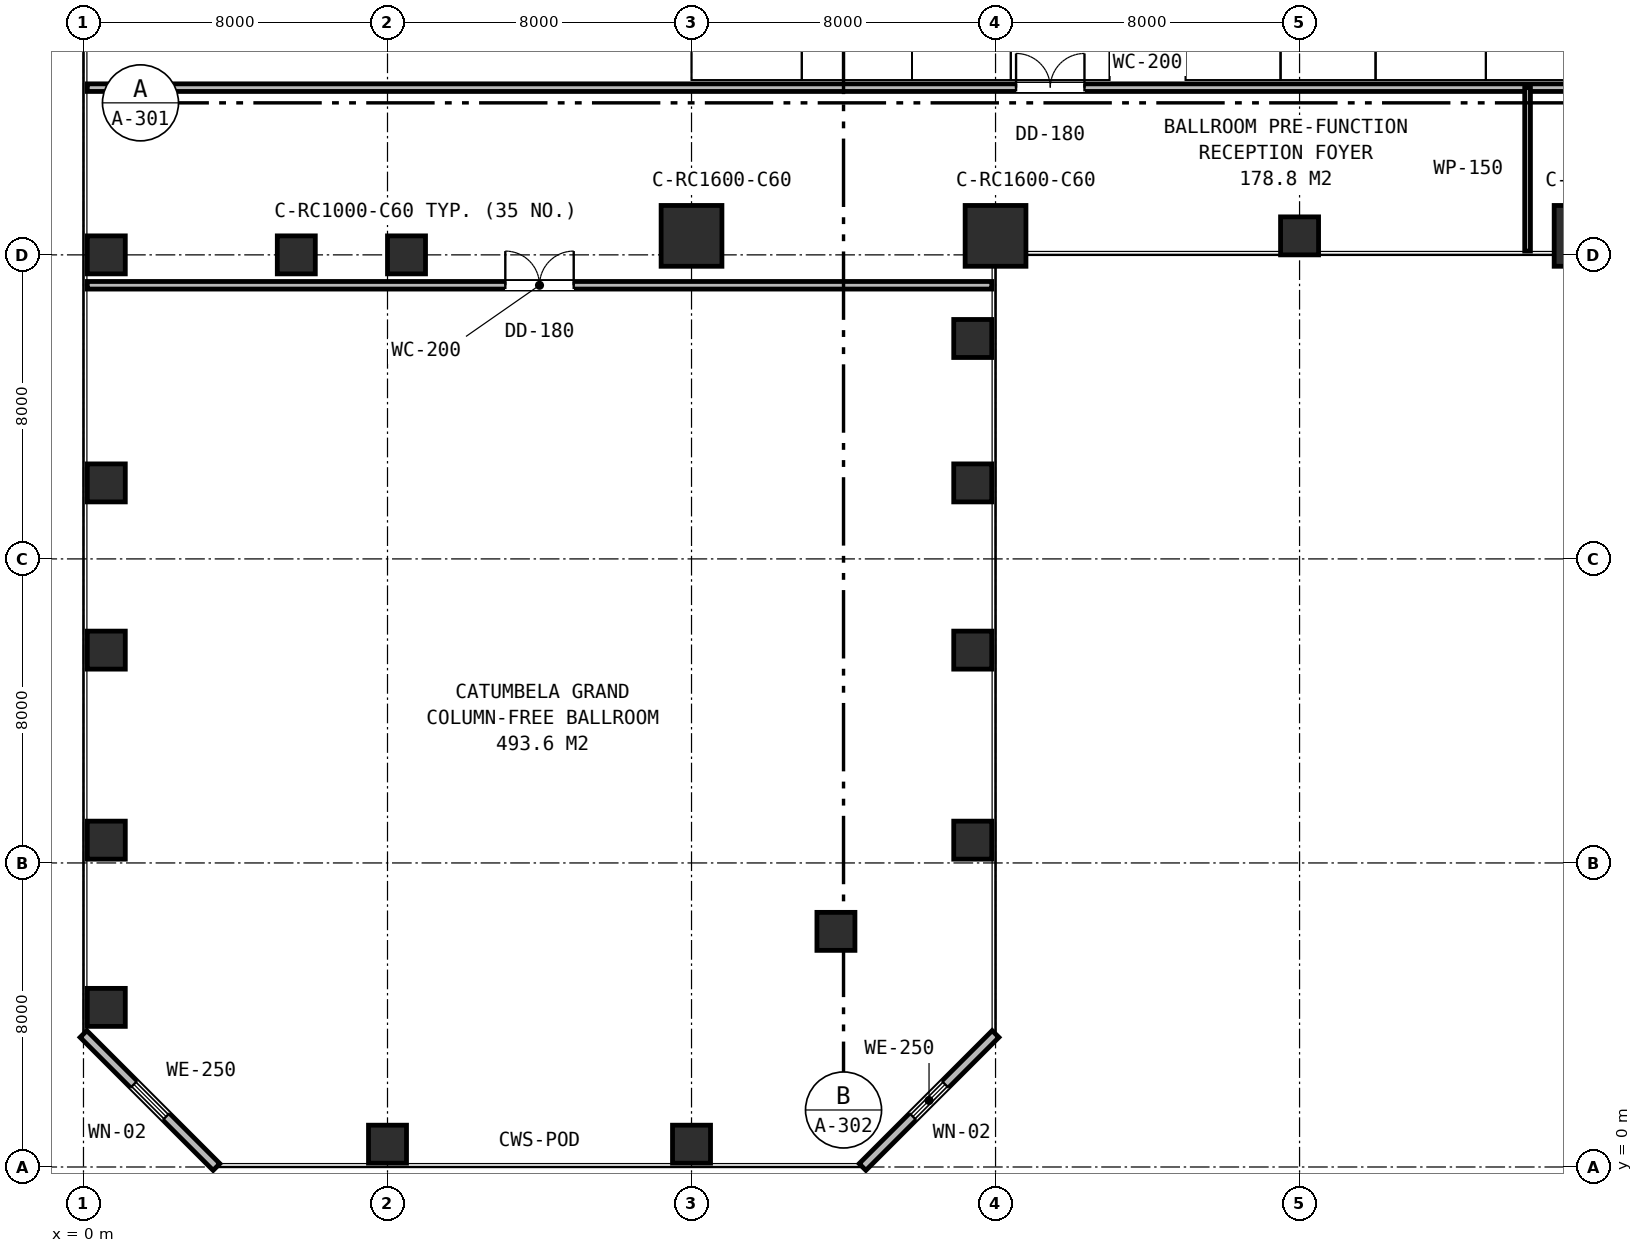
"""IFC4 building model, lengths in metres.
Left out: names, types, materials, properties, quantities, classifications, styles, units other than length and angle.
Written with IfcOpenShell. Run it as: python <this file> out.ifc"""

import sys

from ifc_helpers import new_model, si_unit, direction, frame, frame_2d, origin, origin_2d, place, context, subcontext, project, spatial, rectangle, extrude, element, fill, save


model = new_model("IFC4")
c1 = context("Model", 3, precision=1e-05, world=origin(), true_north=direction((0.0, 1.0)))
c2 = subcontext(c1, "Body", "Model", "MODEL_VIEW")
j1 = project(units=[si_unit("LENGTHUNIT", "METRE"), si_unit("PLANEANGLEUNIT", "RADIAN")], contexts=[c1])
p1 = place(None, origin())
s1 = spatial("IfcSite", under=j1, at=p1, CompositionType="ELEMENT")
p2 = place(p1, origin())
s2 = spatial("IfcBuilding", under=s1, at=p2, CompositionType="ELEMENT")
p3 = place(p2, frame((0.0, 0.0, 15.9)))
s3 = spatial("IfcBuildingStorey", under=s2, at=p3, CompositionType="ELEMENT", Elevation=15.9)
p4 = place(p3, frame((8.5, 24.0, 0.0), z_axis=(0.0, 0.0, 1.0), x_axis=(1.0, 0.0, 0.0)))
e1 = element("IfcColumn", 1, at=p4, inside=s3, PredefinedType="COLUMN", context=c2, shape_type="SweptSolid", body=[
    extrude(rectangle(XDim=1.0, YDim=1.0, at=origin_2d()), origin(), (0.0, 0.0, 1.0), 5.4),
])
for number, where, z_axis, x_axis in (
    (2, (16.0, 24.5, 0.0), (0.0, 0.0, 1.0), (1.0, 0.0, 0.0)),
    (3, (24.0, 24.5, 0.0), (0.0, 0.0, 1.0), (1.0, 0.0, 0.0)),
):
    element("IfcColumn", number, at=place(p3, frame(where, z_axis=z_axis, x_axis=x_axis)), inside=s3, PredefinedType="COLUMN", context=c2, shape_type="SweptSolid", body=[
        extrude(rectangle(XDim=1.6, YDim=1.6, at=origin_2d()), origin(), (0.0, 0.0, 1.0), 5.4),
    ])
p5 = place(p3, frame((32.0, 24.5, 0.0), z_axis=(0.0, 0.0, 1.0), x_axis=(1.0, 0.0, 0.0)))
e4 = element("IfcColumn", 4, at=p5, inside=s3, PredefinedType="COLUMN", context=c2, shape_type="SweptSolid", body=[
    extrude(rectangle(XDim=1.0, YDim=1.0, at=origin_2d()), origin(), (0.0, 0.0, 1.0), 5.4),
])
p6 = place(p3, frame((39.5, 24.5, 0.0), z_axis=(0.0, 0.0, 1.0), x_axis=(1.0, 0.0, 0.0)))
e5 = element("IfcColumn", 5, at=p6, inside=s3, PredefinedType="COLUMN", context=c2, shape_type="SweptSolid", body=[
    extrude(rectangle(XDim=1.6, YDim=1.6, at=origin_2d()), origin(), (0.0, 0.0, 1.0), 5.4),
])
for number, where, z_axis, x_axis in (
    (6, (5.6, 24.0, 0.0), (0.0, 0.0, 1.0), (1.0, 0.0, 0.0)),
    (7, (0.6, 24.0, 0.0), (0.0, 0.0, 1.0), (1.0, 0.0, 0.0)),
    (8, (0.6, 8.6, 0.0), (0.0, 0.0, 1.0), (1.0, 0.0, 0.0)),
    (9, (0.6, 13.6, 0.0), (0.0, 0.0, 1.0), (1.0, 0.0, 0.0)),
    (10, (0.6, 18.0, 0.0), (0.0, 0.0, 1.0), (1.0, 0.0, 0.0)),
    (11, (0.6, 4.2, 0.0), (0.0, 0.0, 1.0), (1.0, 0.0, 0.0)),
    (12, (8.0, 0.6, 0.0), (0.0, 0.0, 1.0), (1.0, 0.0, 0.0)),
    (13, (16.0, 0.6, 0.0), (0.0, 0.0, 1.0), (1.0, 0.0, 0.0)),
    (14, (19.8, 6.2, 0.0), (0.0, 0.0, 1.0), (1.0, 0.0, 0.0)),
    (15, (23.4, 8.6, 0.0), (0.0, 0.0, 1.0), (1.0, 0.0, 0.0)),
    (16, (23.4, 13.6, 0.0), (0.0, 0.0, 1.0), (1.0, 0.0, 0.0)),
    (17, (23.4, 18.0, 0.0), (0.0, 0.0, 1.0), (1.0, 0.0, 0.0)),
    (18, (23.4, 21.8, 0.0), (0.0, 0.0, 1.0), (1.0, 0.0, 0.0)),
):
    element("IfcColumn", number, at=place(p3, frame(where, z_axis=z_axis, x_axis=x_axis)), inside=s3, PredefinedType="COLUMN", context=c2, shape_type="SweptSolid", body=[
        extrude(rectangle(XDim=1.0, YDim=1.0, at=origin_2d()), origin(), (0.0, 0.0, 1.0), 5.4),
    ])
p7 = place(p3, frame((20.5, 0.0, 0.0), z_axis=(0.0, 0.0, 1.0), x_axis=(0.707106781187, 0.707106781187, 0.0)))
e19 = element("IfcWall", 19, at=p7, inside=s3, PredefinedType="STANDARD", context=c2, shape_type="SweptSolid", body=[
    extrude(rectangle(XDim=4.95, YDim=0.25, at=frame_2d((2.475, 0.0))), origin(), (0.0, 0.0, 1.0), 4.94),
])
p8 = place(p7, frame((1.875, 0.0, 0.85)))
e20 = element("IfcOpeningElement", 20, at=p8, cuts=e19, PredefinedType="OPENING", context=c2, shape_type="SweptSolid", body=[
    extrude(rectangle(XDim=1.2, YDim=1.6, at=frame_2d((0.6, 0.8))), frame((0.0, 0.135, 0.0), z_axis=(0.0, -1.0, 0.0), x_axis=(1.0, 0.0, 0.0)), (0.0, 0.0, 1.0), 0.27),
])
p9 = place(p3, frame((0.0, 3.5, 0.0), z_axis=(0.0, 0.0, 1.0), x_axis=(0.707106781187, -0.707106781187, 0.0)))
e21 = element("IfcWall", 21, at=p9, inside=s3, PredefinedType="STANDARD", context=c2, shape_type="SweptSolid", body=[
    extrude(rectangle(XDim=4.95, YDim=0.25, at=frame_2d((2.475, 0.0))), origin(), (0.0, 0.0, 1.0), 4.94),
])
p10 = place(p9, frame((1.875, 0.0, 0.85)))
e22 = element("IfcOpeningElement", 22, at=p10, cuts=e21, PredefinedType="OPENING", context=c2, shape_type="SweptSolid", body=[
    extrude(rectangle(XDim=1.2, YDim=1.6, at=frame_2d((0.6, 0.8))), frame((0.0, 0.135, 0.0), z_axis=(0.0, -1.0, 0.0), x_axis=(1.0, 0.0, 0.0)), (0.0, 0.0, 1.0), 0.27),
])
p11 = place(p3, frame((0.1, 28.4, 0.0), z_axis=(0.0, 0.0, 1.0), x_axis=(1.0, 0.0, 0.0)))
e23 = element("IfcWall", 23, at=p11, inside=s3, PredefinedType="PARTITIONING", context=c2, shape_type="SweptSolid", body=[
    extrude(rectangle(XDim=55.8, YDim=0.2, at=frame_2d((27.9, 0.0))), origin(), (0.0, 0.0, 1.0), 2.98),
])
p12 = place(p11, frame((24.44, 0.0, 0.0)))
e24 = element("IfcOpeningElement", 24, at=p12, cuts=e23, PredefinedType="OPENING", context=c2, shape_type="SweptSolid", body=[
    extrude(rectangle(XDim=1.8, YDim=2.15, at=frame_2d((0.9, 1.075))), frame((0.0, 0.11, 0.0), z_axis=(0.0, -1.0, 0.0), x_axis=(1.0, 0.0, 0.0)), (0.0, 0.0, 1.0), 0.22),
])
p13 = place(p11, frame((46.375, 0.0, 0.0)))
e25 = element("IfcOpeningElement", 25, at=p13, cuts=e23, PredefinedType="OPENING", context=c2, shape_type="SweptSolid", body=[
    extrude(rectangle(XDim=0.95, YDim=2.15, at=frame_2d((0.475, 1.075))), frame((0.0, 0.11, 0.0), z_axis=(0.0, -1.0, 0.0), x_axis=(1.0, 0.0, 0.0)), (0.0, 0.0, 1.0), 0.22),
])
p14 = place(p3, frame((0.1, 23.2, 0.0), z_axis=(0.0, 0.0, 1.0), x_axis=(1.0, 0.0, 0.0)))
e26 = element("IfcWall", 26, at=p14, inside=s3, PredefinedType="PARTITIONING", context=c2, shape_type="SweptSolid", body=[
    extrude(rectangle(XDim=23.8, YDim=0.2, at=frame_2d((11.9, 0.0))), origin(), (0.0, 0.0, 1.0), 2.98),
])
p15 = place(p14, frame((11.0, 0.0, 0.0)))
e27 = element("IfcOpeningElement", 27, at=p15, cuts=e26, PredefinedType="OPENING", context=c2, shape_type="SweptSolid", body=[
    extrude(rectangle(XDim=1.8, YDim=2.15, at=frame_2d((0.9, 1.075))), frame((0.0, 0.11, 0.0), z_axis=(0.0, -1.0, 0.0), x_axis=(1.0, 0.0, 0.0)), (0.0, 0.0, 1.0), 0.22),
])
p16 = place(p3, frame((38.0, 24.1, 0.0), z_axis=(0.0, 0.0, 1.0), x_axis=(0.0, 1.0, 0.0)))
e28 = element("IfcWall", 28, at=p16, inside=s3, PredefinedType="PARTITIONING", context=c2, shape_type="SweptSolid", body=[
    extrude(rectangle(XDim=4.3, YDim=0.15, at=frame_2d((2.15, 0.0))), origin(), (0.0, 0.0, 1.0), 4.48),
])
p17 = place(p8, origin())
e29 = element("IfcWindow", 29, at=p17, inside=s3, PartitioningType="SINGLE_PANEL", PredefinedType="WINDOW", context=c2, shape_type="SweptSolid", body=[
    extrude(rectangle(XDim=1.2, YDim=1.6, at=frame_2d((0.6, 0.8))), frame((0.0, 0.03, 0.0), z_axis=(0.0, -1.0, 0.0), x_axis=(1.0, 0.0, 0.0)), (0.0, 0.0, 1.0), 0.06),
])
fill(e20, e29)
p18 = place(p10, origin())
e30 = element("IfcWindow", 30, at=p18, inside=s3, PartitioningType="SINGLE_PANEL", PredefinedType="WINDOW", context=c2, shape_type="SweptSolid", body=[
    extrude(rectangle(XDim=1.2, YDim=1.6, at=frame_2d((0.6, 0.8))), frame((0.0, 0.03, 0.0), z_axis=(0.0, -1.0, 0.0), x_axis=(1.0, 0.0, 0.0)), (0.0, 0.0, 1.0), 0.06),
])
fill(e22, e30)
p19 = place(p12, origin())
e31 = element("IfcDoor", 31, at=p19, inside=s3, OperationType="DOUBLE_DOOR_SINGLE_SWING", PredefinedType="DOOR", context=c2, shape_type="SweptSolid", body=[
    extrude(rectangle(XDim=1.8, YDim=2.15, at=frame_2d((0.9, 1.075))), frame((0.0, 0.025, 0.0), z_axis=(0.0, -1.0, 0.0), x_axis=(1.0, 0.0, 0.0)), (0.0, 0.0, 1.0), 0.05),
])
fill(e24, e31)
p20 = place(p15, origin())
e32 = element("IfcDoor", 32, at=p20, inside=s3, OperationType="DOUBLE_DOOR_SINGLE_SWING", PredefinedType="DOOR", context=c2, shape_type="SweptSolid", body=[
    extrude(rectangle(XDim=1.8, YDim=2.15, at=frame_2d((0.9, 1.075))), frame((0.0, 0.025, 0.0), z_axis=(0.0, -1.0, 0.0), x_axis=(1.0, 0.0, 0.0)), (0.0, 0.0, 1.0), 0.05),
])
fill(e27, e32)
save(model, sys.argv[1])
